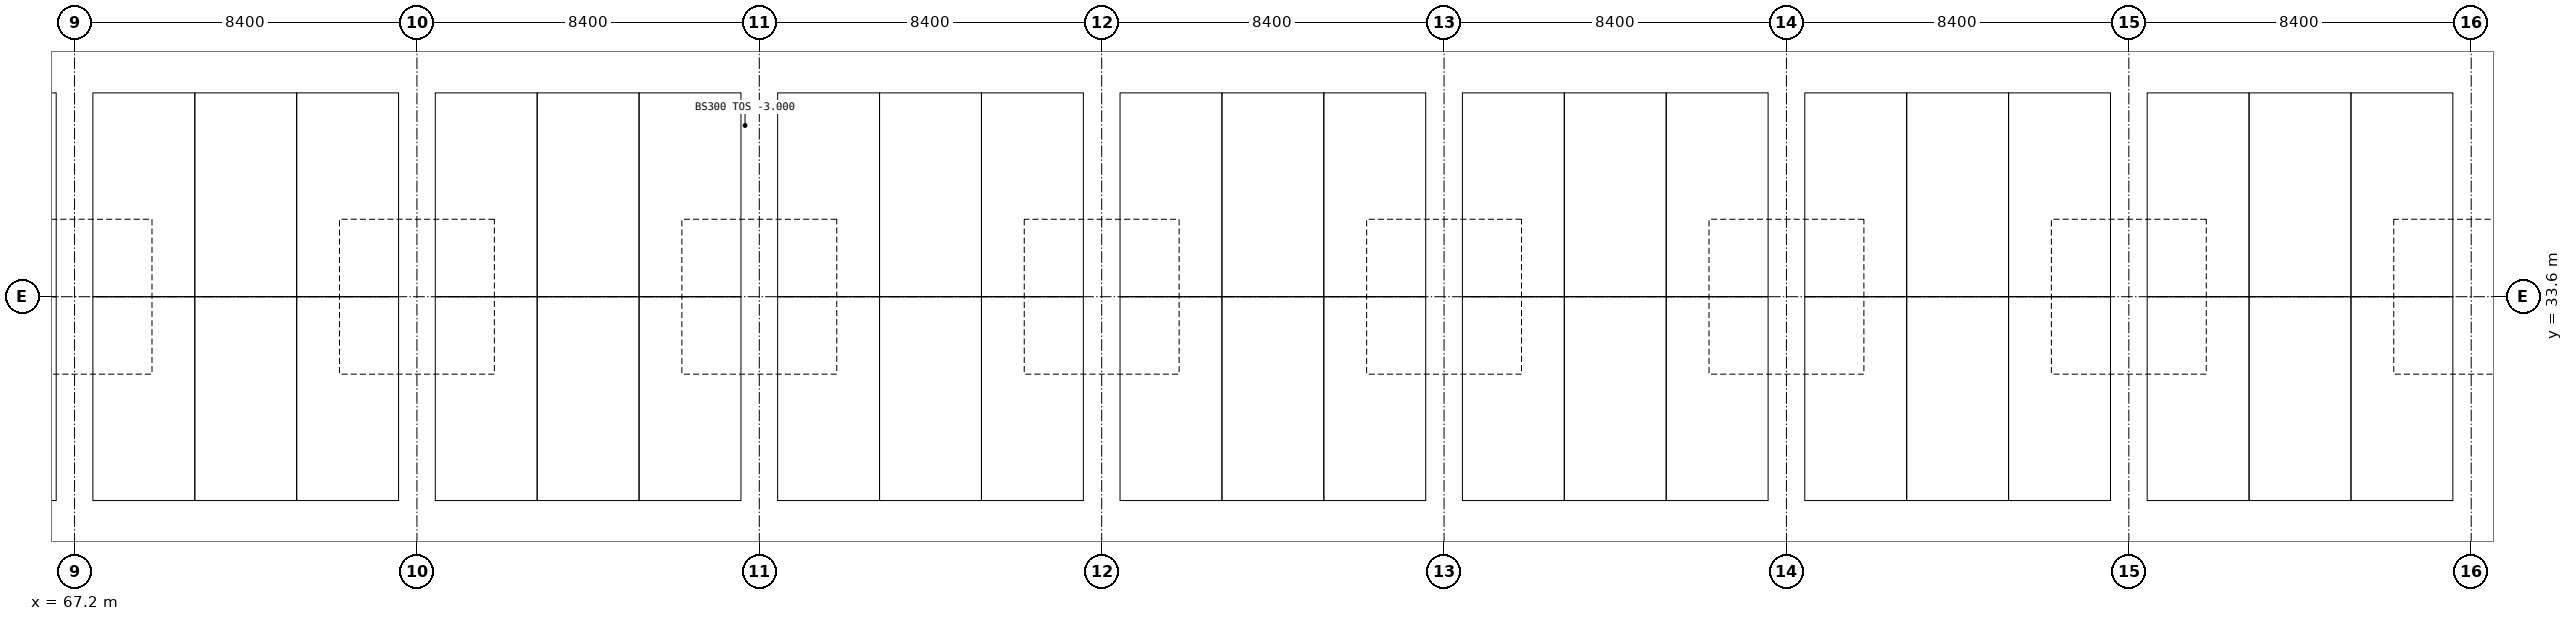
"""IFC4 building model, lengths in metres.
Left out: names, types, materials, properties, quantities, classifications, styles, units other than length and angle.
Written with IfcOpenShell. Run it as: python <this file> out.ifc"""

import sys

from ifc_helpers import new_model, si_unit, direction, frame, origin, origin_2d, place, context, subcontext, project, spatial, rectangle, extrude, element, save


model = new_model("IFC4")
c1 = context("Model", 3, precision=1e-05, world=origin(), true_north=direction((0.0, 1.0)))
c2 = subcontext(c1, "Body", "Model", "MODEL_VIEW")
j1 = project(units=[si_unit("LENGTHUNIT", "METRE"), si_unit("PLANEANGLEUNIT", "RADIAN")], contexts=[c1])
p1 = place(None, origin())
s1 = spatial("IfcSite", under=j1, at=p1, CompositionType="ELEMENT")
p2 = place(p1, origin())
s2 = spatial("IfcBuilding", under=s1, at=p2, CompositionType="ELEMENT")
p3 = place(p2, frame((0.0, 0.0, -3.0)))
s3 = spatial("IfcBuildingStorey", under=s2, at=p3, CompositionType="ELEMENT", Elevation=-3.0)
for number, where, z_axis, x_axis in (
    (1, (67.2, 33.6, 0.0), (0.0, 0.0, 1.0), (1.0, 0.0, 0.0)),
    (2, (75.6, 33.6, 0.0), (0.0, 0.0, 1.0), (1.0, 0.0, 0.0)),
    (3, (84.0, 33.6, 0.0), (0.0, 0.0, 1.0), (1.0, 0.0, 0.0)),
    (4, (92.4, 33.6, 0.0), (0.0, 0.0, 1.0), (1.0, 0.0, 0.0)),
    (5, (100.8, 33.6, 0.0), (0.0, 0.0, 1.0), (1.0, 0.0, 0.0)),
    (6, (109.2, 33.6, 0.0), (0.0, 0.0, 1.0), (1.0, 0.0, 0.0)),
    (7, (117.6, 33.6, 0.0), (0.0, 0.0, 1.0), (1.0, 0.0, 0.0)),
    (8, (126.0, 33.6, 0.0), (0.0, 0.0, 1.0), (1.0, 0.0, 0.0)),
):
    element("IfcColumn", number, at=place(p3, frame(where, z_axis=z_axis, x_axis=x_axis)), inside=s3, PredefinedType="COLUMN", context=c2, shape_type="SweptSolid", body=[
        extrude(rectangle(XDim=0.8, YDim=0.8, at=origin_2d()), origin(), (0.0, 0.0, 1.0), 2.5),
    ])
save(model, sys.argv[1])
